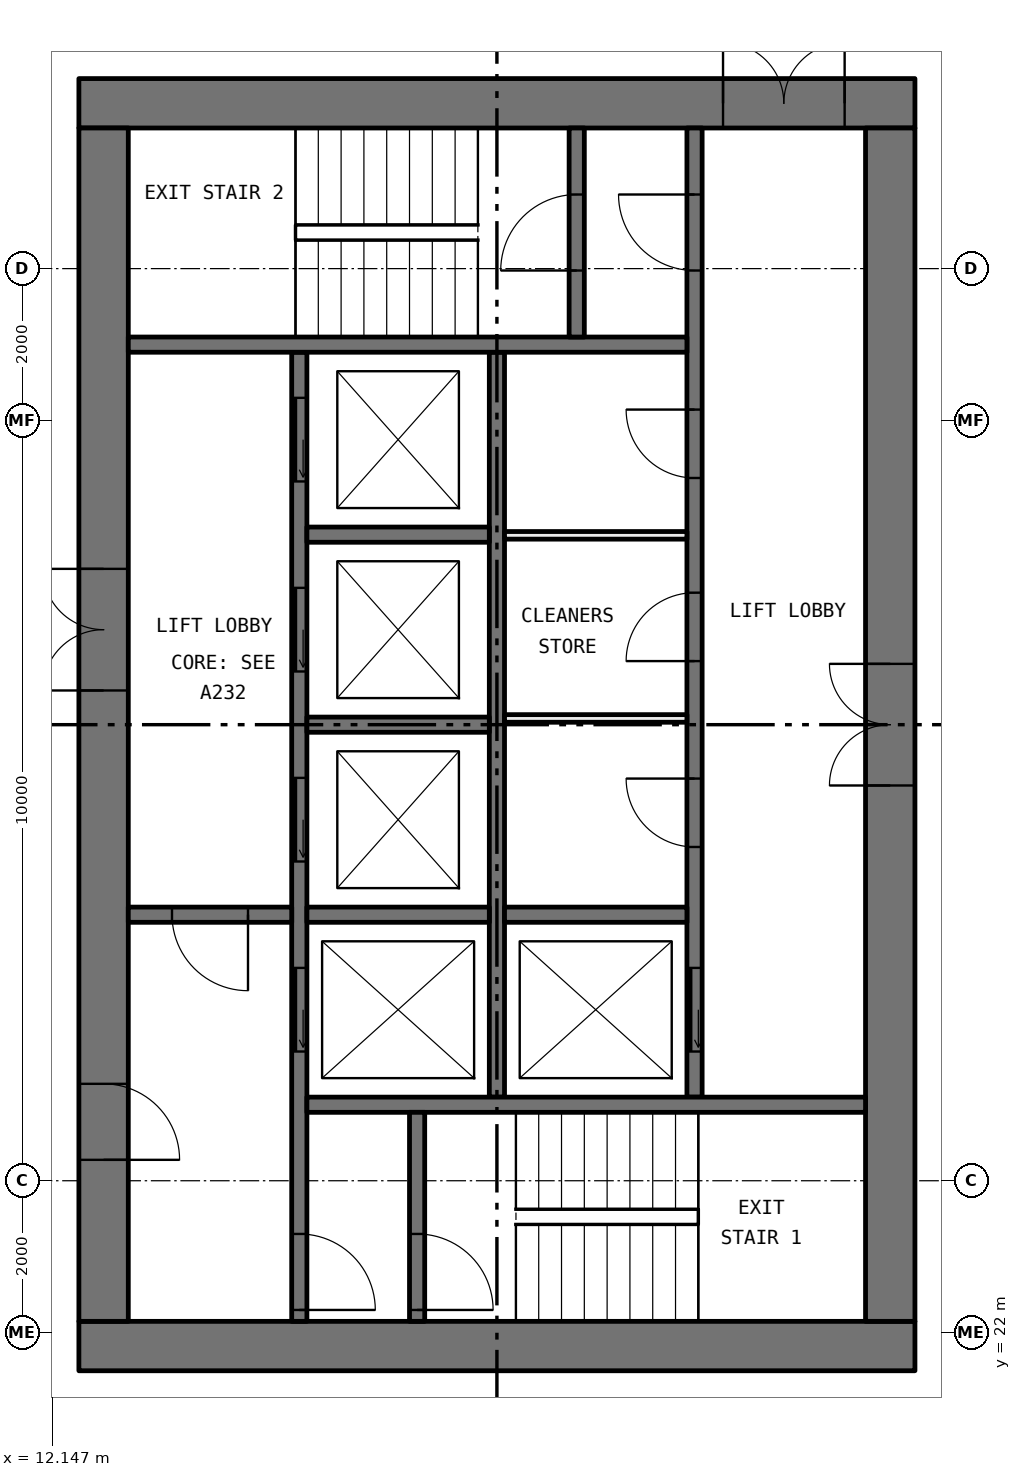
"""IFC4 building model, lengths in metres.
Left out: names, types, materials, properties, quantities, classifications, styles, units other than length and angle.
Written with IfcOpenShell. Run it as: python <this file> out.ifc"""

import sys

from ifc_helpers import new_model, si_unit, direction, frame, frame_2d, origin, place, context, subcontext, project, spatial, rectangle, extrude, element, fill, save


model = new_model("IFC4")
c1 = context("Model", 3, precision=1e-05, world=origin(), true_north=direction((0.0, 1.0)))
c2 = subcontext(c1, "Body", "Model", "MODEL_VIEW")
j1 = project(units=[si_unit("LENGTHUNIT", "METRE"), si_unit("PLANEANGLEUNIT", "RADIAN")], contexts=[c1])
p1 = place(None, origin())
s1 = spatial("IfcSite", under=j1, at=p1, CompositionType="ELEMENT")
p2 = place(p1, origin())
s2 = spatial("IfcBuilding", under=s1, at=p2, CompositionType="ELEMENT")
p3 = place(p2, frame((0.0, 0.0, 120.75)))
s3 = spatial("IfcBuildingStorey", under=s2, at=p3, CompositionType="ELEMENT", Elevation=120.75)
p4 = place(p3, frame((12.5, 21.825, 0.0), z_axis=(0.0, 0.0, 1.0), x_axis=(1.0, 0.0, 0.0)))
e1 = element("IfcWall", 1, at=p4, inside=s3, PredefinedType="SHEAR", context=c2, shape_type="SweptSolid", body=[
    extrude(rectangle(XDim=11.0, YDim=0.65, at=frame_2d((5.5, 0.0))), origin(), (0.0, 0.0, 1.0), 3.05),
])
p5 = place(p3, frame((12.5, 38.175, 0.0), z_axis=(0.0, 0.0, 1.0), x_axis=(1.0, 0.0, 0.0)))
e2 = element("IfcWall", 2, at=p5, inside=s3, PredefinedType="SHEAR", context=c2, shape_type="SweptSolid", body=[
    extrude(rectangle(XDim=11.0, YDim=0.65, at=frame_2d((5.5, 0.0))), origin(), (0.0, 0.0, 1.0), 3.05),
])
p6 = place(p5, frame((8.475, 0.0, 0.0)))
e3 = element("IfcOpeningElement", 3, at=p6, cuts=e2, PredefinedType="OPENING", context=c2, shape_type="SweptSolid", body=[
    extrude(rectangle(XDim=1.6, YDim=2.1, at=frame_2d((0.8, 1.05))), frame((0.0, 0.335, 0.0), z_axis=(0.0, -1.0, 0.0), x_axis=(1.0, 0.0, 0.0)), (0.0, 0.0, 1.0), 0.67),
])
p7 = place(p3, frame((12.825, 22.15, 0.0), z_axis=(0.0, 0.0, 1.0), x_axis=(0.0, 1.0, 0.0)))
e4 = element("IfcWall", 4, at=p7, inside=s3, PredefinedType="SHEAR", context=c2, shape_type="SweptSolid", body=[
    extrude(rectangle(XDim=15.7, YDim=0.65, at=frame_2d((7.85, 0.0))), origin(), (0.0, 0.0, 1.0), 3.05),
])
p8 = place(p7, frame((8.3, 0.0, 0.0)))
e5 = element("IfcOpeningElement", 5, at=p8, cuts=e4, PredefinedType="OPENING", context=c2, shape_type="SweptSolid", body=[
    extrude(rectangle(XDim=1.6, YDim=2.1, at=frame_2d((0.8, 1.05))), frame((0.0, 0.335, 0.0), z_axis=(0.0, -1.0, 0.0), x_axis=(1.0, 0.0, 0.0)), (0.0, 0.0, 1.0), 0.67),
])
p9 = place(p7, frame((2.125, 0.0, 0.0)))
e6 = element("IfcOpeningElement", 6, at=p9, cuts=e4, PredefinedType="OPENING", context=c2, shape_type="SweptSolid", body=[
    extrude(rectangle(XDim=1.0, YDim=2.1, at=frame_2d((0.5, 1.05))), frame((0.0, 0.335, 0.0), z_axis=(0.0, -1.0, 0.0), x_axis=(1.0, 0.0, 0.0)), (0.0, 0.0, 1.0), 0.67),
])
p10 = place(p3, frame((23.175, 22.15, 0.0), z_axis=(0.0, 0.0, 1.0), x_axis=(0.0, 1.0, 0.0)))
e7 = element("IfcWall", 7, at=p10, inside=s3, PredefinedType="SHEAR", context=c2, shape_type="SweptSolid", body=[
    extrude(rectangle(XDim=15.7, YDim=0.65, at=frame_2d((7.85, 0.0))), origin(), (0.0, 0.0, 1.0), 3.05),
])
p11 = place(p10, frame((7.05, 0.0, 0.0)))
e8 = element("IfcOpeningElement", 8, at=p11, cuts=e7, PredefinedType="OPENING", context=c2, shape_type="SweptSolid", body=[
    extrude(rectangle(XDim=1.6, YDim=2.1, at=frame_2d((0.8, 1.05))), frame((0.0, 0.335, 0.0), z_axis=(0.0, -1.0, 0.0), x_axis=(1.0, 0.0, 0.0)), (0.0, 0.0, 1.0), 0.67),
])
p12 = place(p3, frame((15.4, 22.15, 0.0), z_axis=(0.0, 0.0, 1.0), x_axis=(0.0, 1.0, 0.0)))
e9 = element("IfcWall", 9, at=p12, inside=s3, PredefinedType="SOLIDWALL", context=c2, shape_type="SweptSolid", body=[
    extrude(rectangle(XDim=12.75, YDim=0.2, at=frame_2d((6.375, 0.0))), origin(), (0.0, 0.0, 1.0), 3.05),
])
p13 = place(p12, frame((3.55, 0.0, 0.0)))
e10 = element("IfcOpeningElement", 10, at=p13, cuts=e9, PredefinedType="OPENING", context=c2, shape_type="SweptSolid", body=[
    extrude(rectangle(XDim=1.1, YDim=2.1, at=frame_2d((0.55, 1.05))), frame((0.0, 0.11, 0.0), z_axis=(0.0, -1.0, 0.0), x_axis=(1.0, 0.0, 0.0)), (0.0, 0.0, 1.0), 0.22),
])
p14 = place(p12, frame((6.05, 0.0, 0.0)))
e11 = element("IfcOpeningElement", 11, at=p14, cuts=e9, PredefinedType="OPENING", context=c2, shape_type="SweptSolid", body=[
    extrude(rectangle(XDim=1.1, YDim=2.1, at=frame_2d((0.55, 1.05))), frame((0.0, 0.11, 0.0), z_axis=(0.0, -1.0, 0.0), x_axis=(1.0, 0.0, 0.0)), (0.0, 0.0, 1.0), 0.22),
])
p15 = place(p12, frame((8.55, 0.0, 0.0)))
e12 = element("IfcOpeningElement", 12, at=p15, cuts=e9, PredefinedType="OPENING", context=c2, shape_type="SweptSolid", body=[
    extrude(rectangle(XDim=1.1, YDim=2.1, at=frame_2d((0.55, 1.05))), frame((0.0, 0.11, 0.0), z_axis=(0.0, -1.0, 0.0), x_axis=(1.0, 0.0, 0.0)), (0.0, 0.0, 1.0), 0.22),
])
p16 = place(p12, frame((11.05, 0.0, 0.0)))
e13 = element("IfcOpeningElement", 13, at=p16, cuts=e9, PredefinedType="OPENING", context=c2, shape_type="SweptSolid", body=[
    extrude(rectangle(XDim=1.1, YDim=2.1, at=frame_2d((0.55, 1.05))), frame((0.0, 0.11, 0.0), z_axis=(0.0, -1.0, 0.0), x_axis=(1.0, 0.0, 0.0)), (0.0, 0.0, 1.0), 0.22),
])
p17 = place(p12, frame((0.15, 0.0, 0.0)))
e14 = element("IfcOpeningElement", 14, at=p17, cuts=e9, PredefinedType="OPENING", context=c2, shape_type="SweptSolid", body=[
    extrude(rectangle(XDim=1.0, YDim=2.1, at=frame_2d((0.5, 1.05))), frame((0.0, 0.11, 0.0), z_axis=(0.0, -1.0, 0.0), x_axis=(1.0, 0.0, 0.0)), (0.0, 0.0, 1.0), 0.22),
])
p18 = place(p3, frame((20.6, 25.1, 0.0), z_axis=(0.0, 0.0, 1.0), x_axis=(0.0, 1.0, 0.0)))
e15 = element("IfcWall", 15, at=p18, inside=s3, PredefinedType="SOLIDWALL", context=c2, shape_type="SweptSolid", body=[
    extrude(rectangle(XDim=12.75, YDim=0.2, at=frame_2d((6.375, 0.0))), origin(), (0.0, 0.0, 1.0), 3.05),
])
p19 = place(p18, frame((0.6, 0.0, 0.0)))
e16 = element("IfcOpeningElement", 16, at=p19, cuts=e15, PredefinedType="OPENING", context=c2, shape_type="SweptSolid", body=[
    extrude(rectangle(XDim=1.1, YDim=2.1, at=frame_2d((0.55, 1.05))), frame((0.0, 0.11, 0.0), z_axis=(0.0, -1.0, 0.0), x_axis=(1.0, 0.0, 0.0)), (0.0, 0.0, 1.0), 0.22),
])
p20 = place(p18, frame((10.875, 0.0, 0.0)))
e17 = element("IfcOpeningElement", 17, at=p20, cuts=e15, PredefinedType="OPENING", context=c2, shape_type="SweptSolid", body=[
    extrude(rectangle(XDim=1.0, YDim=2.1, at=frame_2d((0.5, 1.05))), frame((0.0, 0.11, 0.0), z_axis=(0.0, -1.0, 0.0), x_axis=(1.0, 0.0, 0.0)), (0.0, 0.0, 1.0), 0.22),
])
p21 = place(p18, frame((3.291, 0.0, 0.0)))
e18 = element("IfcOpeningElement", 18, at=p21, cuts=e15, PredefinedType="OPENING", context=c2, shape_type="SweptSolid", body=[
    extrude(rectangle(XDim=0.9, YDim=2.1, at=frame_2d((0.45, 1.05))), frame((0.0, 0.11, 0.0), z_axis=(0.0, -1.0, 0.0), x_axis=(1.0, 0.0, 0.0)), (0.0, 0.0, 1.0), 0.22),
])
p22 = place(p18, frame((5.737, 0.0, 0.0)))
e19 = element("IfcOpeningElement", 19, at=p22, cuts=e15, PredefinedType="OPENING", context=c2, shape_type="SweptSolid", body=[
    extrude(rectangle(XDim=0.9, YDim=2.1, at=frame_2d((0.45, 1.05))), frame((0.0, 0.11, 0.0), z_axis=(0.0, -1.0, 0.0), x_axis=(1.0, 0.0, 0.0)), (0.0, 0.0, 1.0), 0.22),
])
p23 = place(p18, frame((8.146, 0.0, 0.0)))
e20 = element("IfcOpeningElement", 20, at=p23, cuts=e15, PredefinedType="OPENING", context=c2, shape_type="SweptSolid", body=[
    extrude(rectangle(XDim=0.9, YDim=2.1, at=frame_2d((0.45, 1.05))), frame((0.0, 0.11, 0.0), z_axis=(0.0, -1.0, 0.0), x_axis=(1.0, 0.0, 0.0)), (0.0, 0.0, 1.0), 0.22),
])
p24 = place(p3, frame((18.0, 25.1, 0.0), z_axis=(0.0, 0.0, 1.0), x_axis=(0.0, 1.0, 0.0)))
e21 = element("IfcWall", 21, at=p24, inside=s3, PredefinedType="SOLIDWALL", context=c2, shape_type="SweptSolid", body=[
    extrude(rectangle(XDim=9.8, YDim=0.2, at=frame_2d((4.9, 0.0))), origin(), (0.0, 0.0, 1.0), 3.05),
])
for number, where, z_axis, x_axis in (
    (22, (15.5, 25.0, 0.0), (0.0, 0.0, 1.0), (1.0, 0.0, 0.0)),
    (23, (13.15, 35.0, 0.0), (0.0, 0.0, 1.0), (1.0, 0.0, 0.0)),
):
    element("IfcWall", number, at=place(p3, frame(where, z_axis=z_axis, x_axis=x_axis)), inside=s3, PredefinedType="SOLIDWALL", context=c2, shape_type="SweptSolid", body=[
        extrude(rectangle(XDim=7.35, YDim=0.2, at=frame_2d((3.675, 0.0))), origin(), (0.0, 0.0, 1.0), 3.05),
    ])
p25 = place(p3, frame((13.15, 27.5, 0.0), z_axis=(0.0, 0.0, 1.0), x_axis=(1.0, 0.0, 0.0)))
e24 = element("IfcWall", 24, at=p25, inside=s3, PredefinedType="SOLIDWALL", context=c2, shape_type="SweptSolid", body=[
    extrude(rectangle(XDim=2.15, YDim=0.2, at=frame_2d((1.075, 0.0))), origin(), (0.0, 0.0, 1.0), 3.05),
])
p26 = place(p25, frame((0.575, 0.0, 0.0)))
e25 = element("IfcOpeningElement", 25, at=p26, cuts=e24, PredefinedType="OPENING", context=c2, shape_type="SweptSolid", body=[
    extrude(rectangle(XDim=1.0, YDim=2.1, at=frame_2d((0.5, 1.05))), frame((0.0, 0.11, 0.0), z_axis=(0.0, -1.0, 0.0), x_axis=(1.0, 0.0, 0.0)), (0.0, 0.0, 1.0), 0.22),
])
p27 = place(p3, frame((16.95, 22.15, 0.0), z_axis=(0.0, 0.0, 1.0), x_axis=(0.0, 1.0, 0.0)))
e26 = element("IfcWall", 26, at=p27, inside=s3, PredefinedType="SOLIDWALL", context=c2, shape_type="SweptSolid", body=[
    extrude(rectangle(XDim=2.75, YDim=0.2, at=frame_2d((1.375, 0.0))), origin(), (0.0, 0.0, 1.0), 3.05),
])
p28 = place(p27, frame((0.15, 0.0, 0.0)))
e27 = element("IfcOpeningElement", 27, at=p28, cuts=e26, PredefinedType="OPENING", context=c2, shape_type="SweptSolid", body=[
    extrude(rectangle(XDim=1.0, YDim=2.1, at=frame_2d((0.5, 1.05))), frame((0.0, 0.11, 0.0), z_axis=(0.0, -1.0, 0.0), x_axis=(1.0, 0.0, 0.0)), (0.0, 0.0, 1.0), 0.22),
])
p29 = place(p3, frame((19.05, 35.1, 0.0), z_axis=(0.0, 0.0, 1.0), x_axis=(0.0, 1.0, 0.0)))
e28 = element("IfcWall", 28, at=p29, inside=s3, PredefinedType="SOLIDWALL", context=c2, shape_type="SweptSolid", body=[
    extrude(rectangle(XDim=2.75, YDim=0.2, at=frame_2d((1.375, 0.0))), origin(), (0.0, 0.0, 1.0), 3.05),
])
p30 = place(p29, frame((0.875, 0.0, 0.0)))
e29 = element("IfcOpeningElement", 29, at=p30, cuts=e28, PredefinedType="OPENING", context=c2, shape_type="SweptSolid", body=[
    extrude(rectangle(XDim=1.0, YDim=2.1, at=frame_2d((0.5, 1.05))), frame((0.0, 0.11, 0.0), z_axis=(0.0, -1.0, 0.0), x_axis=(1.0, 0.0, 0.0)), (0.0, 0.0, 1.0), 0.22),
])
for number, where, z_axis, x_axis in (
    (30, (15.5, 27.5, 0.0), (0.0, 0.0, 1.0), (1.0, 0.0, 0.0)),
    (31, (15.5, 30.0, 0.0), (0.0, 0.0, 1.0), (1.0, 0.0, 0.0)),
    (32, (15.5, 32.5, 0.0), (0.0, 0.0, 1.0), (1.0, 0.0, 0.0)),
    (33, (18.1, 27.5, 0.0), (0.0, 0.0, 1.0), (1.0, 0.0, 0.0)),
):
    element("IfcWall", number, at=place(p3, frame(where, z_axis=z_axis, x_axis=x_axis)), inside=s3, PredefinedType="SOLIDWALL", context=c2, shape_type="SweptSolid", body=[
        extrude(rectangle(XDim=2.4, YDim=0.2, at=frame_2d((1.2, 0.0))), origin(), (0.0, 0.0, 1.0), 3.05),
    ])
for number, where, z_axis, x_axis in (
    (34, (18.1, 30.082, 0.0), (0.0, 0.0, 1.0), (1.0, 0.0, 0.0)),
    (35, (18.1, 32.491, 0.0), (0.0, 0.0, 1.0), (1.0, 0.0, 0.0)),
):
    element("IfcWall", number, at=place(p3, frame(where, z_axis=z_axis, x_axis=x_axis)), inside=s3, PredefinedType="PARTITIONING", context=c2, shape_type="SweptSolid", body=[
        extrude(rectangle(XDim=2.4, YDim=0.1, at=frame_2d((1.2, 0.0))), origin(), (0.0, 0.0, 1.0), 3.05),
    ])
p31 = place(p19, origin())
e36 = element("IfcDoor", 36, at=p31, inside=s3, OperationType="SLIDING_TO_LEFT", PredefinedType="DOOR", context=c2, shape_type="SweptSolid", body=[
    extrude(rectangle(XDim=1.1, YDim=2.1, at=frame_2d((0.55, 1.05))), frame((0.0, 0.025, 0.0), z_axis=(0.0, -1.0, 0.0), x_axis=(1.0, 0.0, 0.0)), (0.0, 0.0, 1.0), 0.05),
])
fill(e16, e36)
p32 = place(p13, origin())
e37 = element("IfcDoor", 37, at=p32, inside=s3, OperationType="SLIDING_TO_LEFT", PredefinedType="DOOR", context=c2, shape_type="SweptSolid", body=[
    extrude(rectangle(XDim=1.1, YDim=2.1, at=frame_2d((0.55, 1.05))), frame((0.0, 0.025, 0.0), z_axis=(0.0, -1.0, 0.0), x_axis=(1.0, 0.0, 0.0)), (0.0, 0.0, 1.0), 0.05),
])
fill(e10, e37)
p33 = place(p14, origin())
e38 = element("IfcDoor", 38, at=p33, inside=s3, OperationType="SLIDING_TO_LEFT", PredefinedType="DOOR", context=c2, shape_type="SweptSolid", body=[
    extrude(rectangle(XDim=1.1, YDim=2.1, at=frame_2d((0.55, 1.05))), frame((0.0, 0.025, 0.0), z_axis=(0.0, -1.0, 0.0), x_axis=(1.0, 0.0, 0.0)), (0.0, 0.0, 1.0), 0.05),
])
fill(e11, e38)
p34 = place(p15, origin())
e39 = element("IfcDoor", 39, at=p34, inside=s3, OperationType="SLIDING_TO_LEFT", PredefinedType="DOOR", context=c2, shape_type="SweptSolid", body=[
    extrude(rectangle(XDim=1.1, YDim=2.1, at=frame_2d((0.55, 1.05))), frame((0.0, 0.025, 0.0), z_axis=(0.0, -1.0, 0.0), x_axis=(1.0, 0.0, 0.0)), (0.0, 0.0, 1.0), 0.05),
])
fill(e12, e39)
p35 = place(p16, origin())
e40 = element("IfcDoor", 40, at=p35, inside=s3, OperationType="SLIDING_TO_LEFT", PredefinedType="DOOR", context=c2, shape_type="SweptSolid", body=[
    extrude(rectangle(XDim=1.1, YDim=2.1, at=frame_2d((0.55, 1.05))), frame((0.0, 0.025, 0.0), z_axis=(0.0, -1.0, 0.0), x_axis=(1.0, 0.0, 0.0)), (0.0, 0.0, 1.0), 0.05),
])
fill(e13, e40)
p36 = place(p28, frame((1.0, 0.0, 0.0), x_axis=(-1.0, 0.0, 0.0)))
e41 = element("IfcDoor", 41, at=p36, inside=s3, OperationType="SINGLE_SWING_LEFT", PredefinedType="DOOR", context=c2, shape_type="SweptSolid", body=[
    extrude(rectangle(XDim=1.0, YDim=2.1, at=frame_2d((0.5, 1.05))), frame((0.0, 0.025, 0.0), z_axis=(0.0, -1.0, 0.0), x_axis=(1.0, 0.0, 0.0)), (0.0, 0.0, 1.0), 0.05),
])
fill(e27, e41)
p37 = place(p17, frame((1.0, 0.0, 0.0), x_axis=(-1.0, 0.0, 0.0)))
e42 = element("IfcDoor", 42, at=p37, inside=s3, OperationType="SINGLE_SWING_LEFT", PredefinedType="DOOR", context=c2, shape_type="SweptSolid", body=[
    extrude(rectangle(XDim=1.0, YDim=2.1, at=frame_2d((0.5, 1.05))), frame((0.0, 0.025, 0.0), z_axis=(0.0, -1.0, 0.0), x_axis=(1.0, 0.0, 0.0)), (0.0, 0.0, 1.0), 0.05),
])
fill(e14, e42)
p38 = place(p20, origin())
e43 = element("IfcDoor", 43, at=p38, inside=s3, OperationType="SINGLE_SWING_LEFT", PredefinedType="DOOR", context=c2, shape_type="SweptSolid", body=[
    extrude(rectangle(XDim=1.0, YDim=2.1, at=frame_2d((0.5, 1.05))), frame((0.0, 0.025, 0.0), z_axis=(0.0, -1.0, 0.0), x_axis=(1.0, 0.0, 0.0)), (0.0, 0.0, 1.0), 0.05),
])
fill(e17, e43)
p39 = place(p30, origin())
e44 = element("IfcDoor", 44, at=p39, inside=s3, OperationType="SINGLE_SWING_RIGHT", PredefinedType="DOOR", context=c2, shape_type="SweptSolid", body=[
    extrude(rectangle(XDim=1.0, YDim=2.1, at=frame_2d((0.5, 1.05))), frame((0.0, 0.025, 0.0), z_axis=(0.0, -1.0, 0.0), x_axis=(1.0, 0.0, 0.0)), (0.0, 0.0, 1.0), 0.05),
])
fill(e29, e44)
p40 = place(p26, frame((1.0, 0.0, 0.0), x_axis=(-1.0, 0.0, 0.0)))
e45 = element("IfcDoor", 45, at=p40, inside=s3, OperationType="SINGLE_SWING_RIGHT", PredefinedType="DOOR", context=c2, shape_type="SweptSolid", body=[
    extrude(rectangle(XDim=1.0, YDim=2.1, at=frame_2d((0.5, 1.05))), frame((0.0, 0.025, 0.0), z_axis=(0.0, -1.0, 0.0), x_axis=(1.0, 0.0, 0.0)), (0.0, 0.0, 1.0), 0.05),
])
fill(e25, e45)
p41 = place(p8, origin())
e46 = element("IfcDoor", 46, at=p41, inside=s3, OperationType="DOUBLE_DOOR_SINGLE_SWING", PredefinedType="DOOR", context=c2, shape_type="SweptSolid", body=[
    extrude(rectangle(XDim=1.6, YDim=2.1, at=frame_2d((0.8, 1.05))), frame((0.0, 0.025, 0.0), z_axis=(0.0, -1.0, 0.0), x_axis=(1.0, 0.0, 0.0)), (0.0, 0.0, 1.0), 0.05),
])
fill(e5, e46)
p42 = place(p9, frame((1.0, 0.0, 0.0), x_axis=(-1.0, 0.0, 0.0)))
e47 = element("IfcDoor", 47, at=p42, inside=s3, OperationType="SINGLE_SWING_LEFT", PredefinedType="DOOR", context=c2, shape_type="SweptSolid", body=[
    extrude(rectangle(XDim=1.0, YDim=2.1, at=frame_2d((0.5, 1.05))), frame((0.0, 0.025, 0.0), z_axis=(0.0, -1.0, 0.0), x_axis=(1.0, 0.0, 0.0)), (0.0, 0.0, 1.0), 0.05),
])
fill(e6, e47)
p43 = place(p6, origin())
e48 = element("IfcDoor", 48, at=p43, inside=s3, OperationType="DOUBLE_DOOR_SINGLE_SWING", PredefinedType="DOOR", context=c2, shape_type="SweptSolid", body=[
    extrude(rectangle(XDim=1.6, YDim=2.1, at=frame_2d((0.8, 1.05))), frame((0.0, 0.025, 0.0), z_axis=(0.0, -1.0, 0.0), x_axis=(1.0, 0.0, 0.0)), (0.0, 0.0, 1.0), 0.05),
])
fill(e3, e48)
p44 = place(p11, origin())
e49 = element("IfcDoor", 49, at=p44, inside=s3, OperationType="DOUBLE_DOOR_SINGLE_SWING", PredefinedType="DOOR", context=c2, shape_type="SweptSolid", body=[
    extrude(rectangle(XDim=1.6, YDim=2.1, at=frame_2d((0.8, 1.05))), frame((0.0, 0.025, 0.0), z_axis=(0.0, -1.0, 0.0), x_axis=(1.0, 0.0, 0.0)), (0.0, 0.0, 1.0), 0.05),
])
fill(e8, e49)
p45 = place(p21, origin())
e50 = element("IfcDoor", 50, at=p45, inside=s3, OperationType="SINGLE_SWING_LEFT", PredefinedType="DOOR", context=c2, shape_type="SweptSolid", body=[
    extrude(rectangle(XDim=0.9, YDim=2.1, at=frame_2d((0.45, 1.05))), frame((0.0, 0.025, 0.0), z_axis=(0.0, -1.0, 0.0), x_axis=(1.0, 0.0, 0.0)), (0.0, 0.0, 1.0), 0.05),
])
fill(e18, e50)
p46 = place(p22, origin())
e51 = element("IfcDoor", 51, at=p46, inside=s3, OperationType="SINGLE_SWING_RIGHT", PredefinedType="DOOR", context=c2, shape_type="SweptSolid", body=[
    extrude(rectangle(XDim=0.9, YDim=2.1, at=frame_2d((0.45, 1.05))), frame((0.0, 0.025, 0.0), z_axis=(0.0, -1.0, 0.0), x_axis=(1.0, 0.0, 0.0)), (0.0, 0.0, 1.0), 0.05),
])
fill(e19, e51)
p47 = place(p23, origin())
e52 = element("IfcDoor", 52, at=p47, inside=s3, OperationType="SINGLE_SWING_LEFT", PredefinedType="DOOR", context=c2, shape_type="SweptSolid", body=[
    extrude(rectangle(XDim=0.9, YDim=2.1, at=frame_2d((0.45, 1.05))), frame((0.0, 0.025, 0.0), z_axis=(0.0, -1.0, 0.0), x_axis=(1.0, 0.0, 0.0)), (0.0, 0.0, 1.0), 0.05),
])
fill(e20, e52)
save(model, sys.argv[1])
